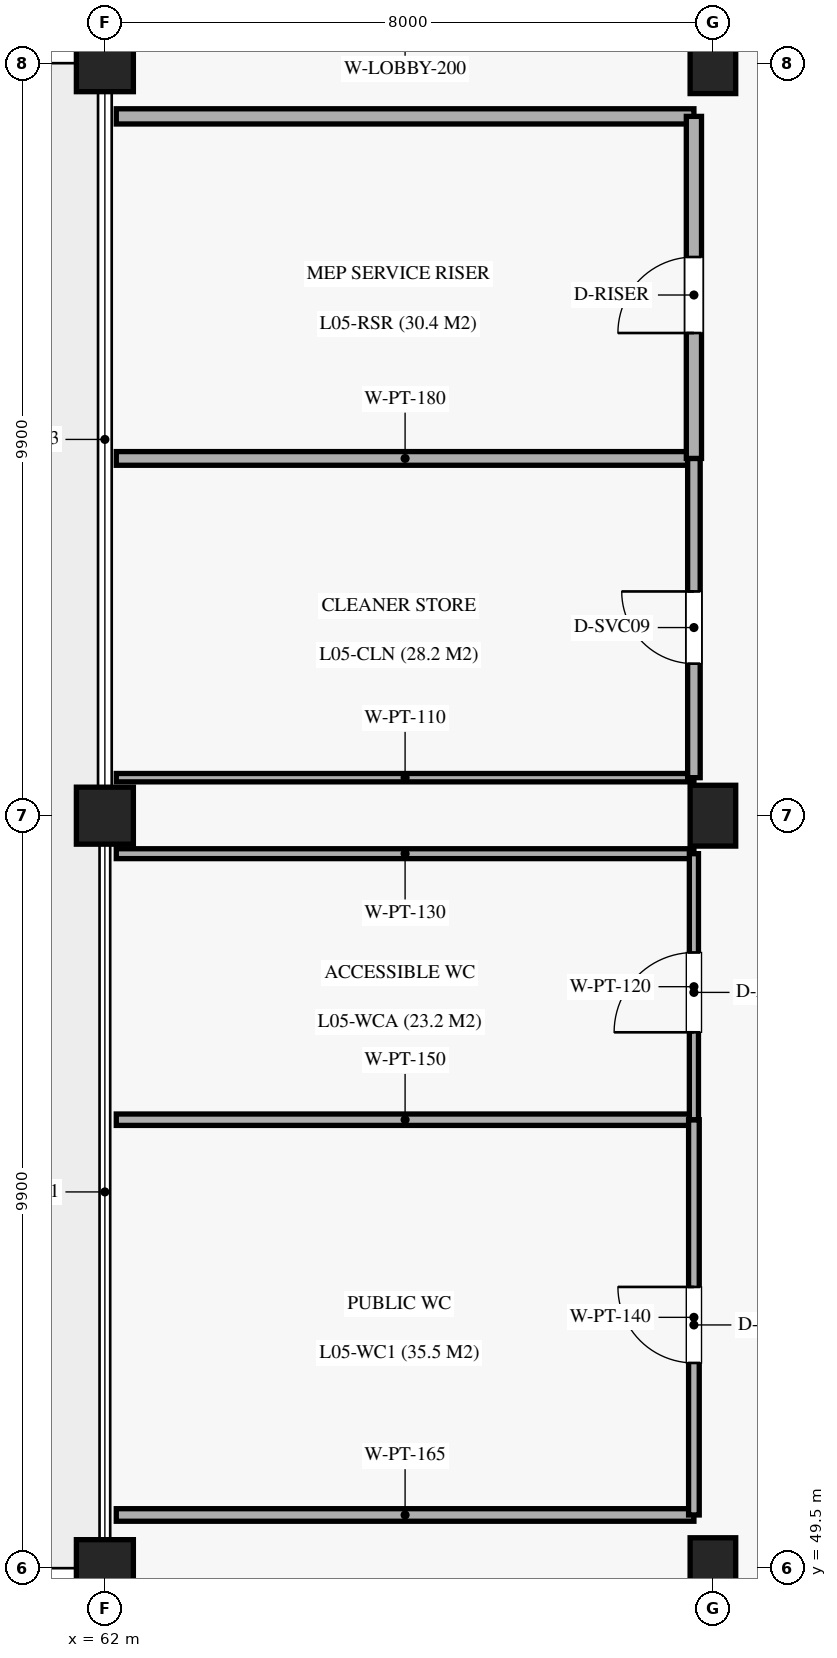
"""IFC4 building model, lengths in metres.
Left out: names, types, materials, properties, quantities, classifications, styles, units other than length and angle.
Written with IfcOpenShell. Run it as: python <this file> out.ifc"""

import sys

from ifc_helpers import new_model, si_unit, direction, frame, frame_2d, origin, origin_2d, place, context, subcontext, project, spatial, rectangle, extrude, element, fill, save


model = new_model("IFC4")
c1 = context("Model", 3, precision=1e-05, world=origin(), true_north=direction((0.0, 1.0)))
c2 = subcontext(c1, "Body", "Model", "MODEL_VIEW")
j1 = project(units=[si_unit("LENGTHUNIT", "METRE"), si_unit("PLANEANGLEUNIT", "RADIAN")], contexts=[c1])
p1 = place(None, origin())
s1 = spatial("IfcSite", under=j1, at=p1, CompositionType="ELEMENT")
p2 = place(p1, origin())
s2 = spatial("IfcBuilding", under=s1, at=p2, CompositionType="ELEMENT")
p3 = place(p2, frame((0.0, 0.0, 28.56)))
s3 = spatial("IfcBuildingStorey", under=s2, at=p3, CompositionType="ELEMENT", Elevation=28.56)
for number, where, z_axis, x_axis in (
    (1, (62.0, 49.5, 0.0), (0.0, 0.0, 1.0), (1.0, 0.0, 0.0)),
    (2, (62.0, 59.4, 0.0), (0.0, 0.0, 1.0), (1.0, 0.0, 0.0)),
    (3, (62.0, 69.3, 0.0), (0.0, 0.0, 1.0), (1.0, 0.0, 0.0)),
):
    element("IfcColumn", number, at=place(p3, frame(where, z_axis=z_axis, x_axis=x_axis)), inside=s3, PredefinedType="COLUMN", context=c2, shape_type="SweptSolid", body=[
        extrude(rectangle(XDim=0.75, YDim=0.75, at=origin_2d()), origin(), (0.0, 0.0, 1.0), 4.59),
    ])
for number, where, z_axis, x_axis in (
    (4, (70.0, 49.5, 0.0), (0.0, 0.0, 1.0), (1.0, 0.0, 0.0)),
    (5, (70.0, 59.4, 0.0), (0.0, 0.0, 1.0), (1.0, 0.0, 0.0)),
    (6, (70.0, 69.3, 0.0), (0.0, 0.0, 1.0), (1.0, 0.0, 0.0)),
):
    element("IfcColumn", number, at=place(p3, frame(where, z_axis=z_axis, x_axis=x_axis)), inside=s3, PredefinedType="COLUMN", context=c2, shape_type="SweptSolid", body=[
        extrude(rectangle(XDim=0.6, YDim=0.8, at=origin_2d()), origin(), (0.0, 0.0, 1.0), 4.59),
    ])
p4 = place(p3, frame((62.15, 50.2, 0.0), z_axis=(0.0, 0.0, 1.0), x_axis=(1.0, 0.0, 0.0)))
e7 = element("IfcWall", 7, at=p4, inside=s3, PredefinedType="PARTITIONING", context=c2, shape_type="SweptSolid", body=[
    extrude(rectangle(XDim=7.6, YDim=0.165, at=frame_2d((3.8, 0.0))), origin(), (0.0, 0.0, 1.0), 3.47),
])
p5 = place(p3, frame((62.15, 55.4, 0.0), z_axis=(0.0, 0.0, 1.0), x_axis=(1.0, 0.0, 0.0)))
e8 = element("IfcWall", 8, at=p5, inside=s3, PredefinedType="PARTITIONING", context=c2, shape_type="SweptSolid", body=[
    extrude(rectangle(XDim=7.6, YDim=0.15, at=frame_2d((3.8, 0.0))), origin(), (0.0, 0.0, 1.0), 3.47),
])
p6 = place(p3, frame((69.75, 50.2, 0.0), z_axis=(0.0, 0.0, 1.0), x_axis=(0.0, 1.0, 0.0)))
e9 = element("IfcWall", 9, at=p6, inside=s3, PredefinedType="PARTITIONING", context=c2, shape_type="SweptSolid", body=[
    extrude(rectangle(XDim=5.2, YDim=0.14, at=frame_2d((2.6, 0.0))), origin(), (0.0, 0.0, 1.0), 3.47),
])
p7 = place(p6, frame((2.0, 0.0, 0.0)))
e10 = element("IfcOpeningElement", 10, at=p7, cuts=e9, PredefinedType="OPENING", context=c2, shape_type="SweptSolid", body=[
    extrude(rectangle(XDim=1.0, YDim=2.1, at=frame_2d((0.5, 1.05))), frame((0.0, 0.08, 0.0), z_axis=(0.0, -1.0, 0.0), x_axis=(1.0, 0.0, 0.0)), (0.0, 0.0, 1.0), 0.16),
])
p8 = place(p3, frame((62.15, 58.9, 0.0), z_axis=(0.0, 0.0, 1.0), x_axis=(1.0, 0.0, 0.0)))
e11 = element("IfcWall", 11, at=p8, inside=s3, PredefinedType="PARTITIONING", context=c2, shape_type="SweptSolid", body=[
    extrude(rectangle(XDim=7.6, YDim=0.13, at=frame_2d((3.8, 0.0))), origin(), (0.0, 0.0, 1.0), 3.47),
])
p9 = place(p3, frame((69.75, 55.4, 0.0), z_axis=(0.0, 0.0, 1.0), x_axis=(0.0, 1.0, 0.0)))
e12 = element("IfcWall", 12, at=p9, inside=s3, PredefinedType="PARTITIONING", context=c2, shape_type="SweptSolid", body=[
    extrude(rectangle(XDim=3.5, YDim=0.12, at=frame_2d((1.75, 0.0))), origin(), (0.0, 0.0, 1.0), 3.47),
])
p10 = place(p9, frame((1.15, 0.0, 0.0)))
e13 = element("IfcOpeningElement", 13, at=p10, cuts=e12, PredefinedType="OPENING", context=c2, shape_type="SweptSolid", body=[
    extrude(rectangle(XDim=1.05, YDim=2.15, at=frame_2d((0.525, 1.075))), frame((0.0, 0.07, 0.0), z_axis=(0.0, -1.0, 0.0), x_axis=(1.0, 0.0, 0.0)), (0.0, 0.0, 1.0), 0.14),
])
p11 = place(p3, frame((62.15, 59.9, 0.0), z_axis=(0.0, 0.0, 1.0), x_axis=(1.0, 0.0, 0.0)))
e14 = element("IfcWall", 14, at=p11, inside=s3, PredefinedType="PARTITIONING", context=c2, shape_type="SweptSolid", body=[
    extrude(rectangle(XDim=7.6, YDim=0.11, at=frame_2d((3.8, 0.0))), origin(), (0.0, 0.0, 1.0), 3.47),
])
p12 = place(p3, frame((62.15, 64.1, 0.0), z_axis=(0.0, 0.0, 1.0), x_axis=(1.0, 0.0, 0.0)))
e15 = element("IfcWall", 15, at=p12, inside=s3, PredefinedType="PARTITIONING", context=c2, shape_type="SweptSolid", body=[
    extrude(rectangle(XDim=7.6, YDim=0.18, at=frame_2d((3.8, 0.0))), origin(), (0.0, 0.0, 1.0), 3.47),
])
p13 = place(p3, frame((69.75, 59.9, 0.0), z_axis=(0.0, 0.0, 1.0), x_axis=(0.0, 1.0, 0.0)))
e16 = element("IfcWall", 16, at=p13, inside=s3, PredefinedType="PARTITIONING", context=c2, shape_type="SweptSolid", body=[
    extrude(rectangle(XDim=4.2, YDim=0.165, at=frame_2d((2.1, 0.0))), origin(), (0.0, 0.0, 1.0), 3.47),
])
p14 = place(p13, frame((1.5, 0.0, 0.0)))
e17 = element("IfcOpeningElement", 17, at=p14, cuts=e16, PredefinedType="OPENING", context=c2, shape_type="SweptSolid", body=[
    extrude(rectangle(XDim=0.95, YDim=2.1, at=frame_2d((0.475, 1.05))), frame((0.0, 0.093, 0.0), z_axis=(0.0, -1.0, 0.0), x_axis=(1.0, 0.0, 0.0)), (0.0, 0.0, 1.0), 0.185),
])
p15 = place(p3, frame((62.15, 68.6, 0.0), z_axis=(0.0, 0.0, 1.0), x_axis=(1.0, 0.0, 0.0)))
e18 = element("IfcWall", 18, at=p15, inside=s3, PredefinedType="SOLIDWALL", context=c2, shape_type="SweptSolid", body=[
    extrude(rectangle(XDim=7.6, YDim=0.2, at=frame_2d((3.8, 0.0))), origin(), (0.0, 0.0, 1.0), 3.47),
])
p16 = place(p3, frame((69.75, 64.1, 0.0), z_axis=(0.0, 0.0, 1.0), x_axis=(0.0, 1.0, 0.0)))
e19 = element("IfcWall", 19, at=p16, inside=s3, PredefinedType="SOLIDWALL", context=c2, shape_type="SweptSolid", body=[
    extrude(rectangle(XDim=4.5, YDim=0.2, at=frame_2d((2.25, 0.0))), origin(), (0.0, 0.0, 1.0), 3.47),
])
p17 = place(p16, frame((1.65, 0.0, 0.0)))
e20 = element("IfcOpeningElement", 20, at=p17, cuts=e19, PredefinedType="OPENING", context=c2, shape_type="SweptSolid", body=[
    extrude(rectangle(XDim=1.0, YDim=2.15, at=frame_2d((0.5, 1.075))), frame((0.0, 0.11, 0.0), z_axis=(0.0, -1.0, 0.0), x_axis=(1.0, 0.0, 0.0)), (0.0, 0.0, 1.0), 0.22),
])
p18 = place(p7, origin())
e21 = element("IfcDoor", 21, at=p18, inside=s3, OperationType="SINGLE_SWING_RIGHT", PredefinedType="DOOR", context=c2, shape_type="SweptSolid", body=[
    extrude(rectangle(XDim=1.0, YDim=2.1, at=frame_2d((0.5, 1.05))), frame((0.0, 0.025, 0.0), z_axis=(0.0, -1.0, 0.0), x_axis=(1.0, 0.0, 0.0)), (0.0, 0.0, 1.0), 0.05),
])
fill(e10, e21)
p19 = place(p10, origin())
e22 = element("IfcDoor", 22, at=p19, inside=s3, OperationType="SINGLE_SWING_LEFT", PredefinedType="DOOR", context=c2, shape_type="SweptSolid", body=[
    extrude(rectangle(XDim=1.05, YDim=2.15, at=frame_2d((0.525, 1.075))), frame((0.0, 0.025, 0.0), z_axis=(0.0, -1.0, 0.0), x_axis=(1.0, 0.0, 0.0)), (0.0, 0.0, 1.0), 0.05),
])
fill(e13, e22)
p20 = place(p14, origin())
e23 = element("IfcDoor", 23, at=p20, inside=s3, OperationType="SINGLE_SWING_RIGHT", PredefinedType="DOOR", context=c2, shape_type="SweptSolid", body=[
    extrude(rectangle(XDim=0.95, YDim=2.1, at=frame_2d((0.475, 1.05))), frame((0.0, 0.025, 0.0), z_axis=(0.0, -1.0, 0.0), x_axis=(1.0, 0.0, 0.0)), (0.0, 0.0, 1.0), 0.05),
])
fill(e17, e23)
p21 = place(p17, origin())
e24 = element("IfcDoor", 24, at=p21, inside=s3, OperationType="SINGLE_SWING_LEFT", PredefinedType="DOOR", context=c2, shape_type="SweptSolid", body=[
    extrude(rectangle(XDim=1.0, YDim=2.15, at=frame_2d((0.5, 1.075))), frame((0.0, 0.025, 0.0), z_axis=(0.0, -1.0, 0.0), x_axis=(1.0, 0.0, 0.0)), (0.0, 0.0, 1.0), 0.05),
])
fill(e20, e24)
save(model, sys.argv[1])
